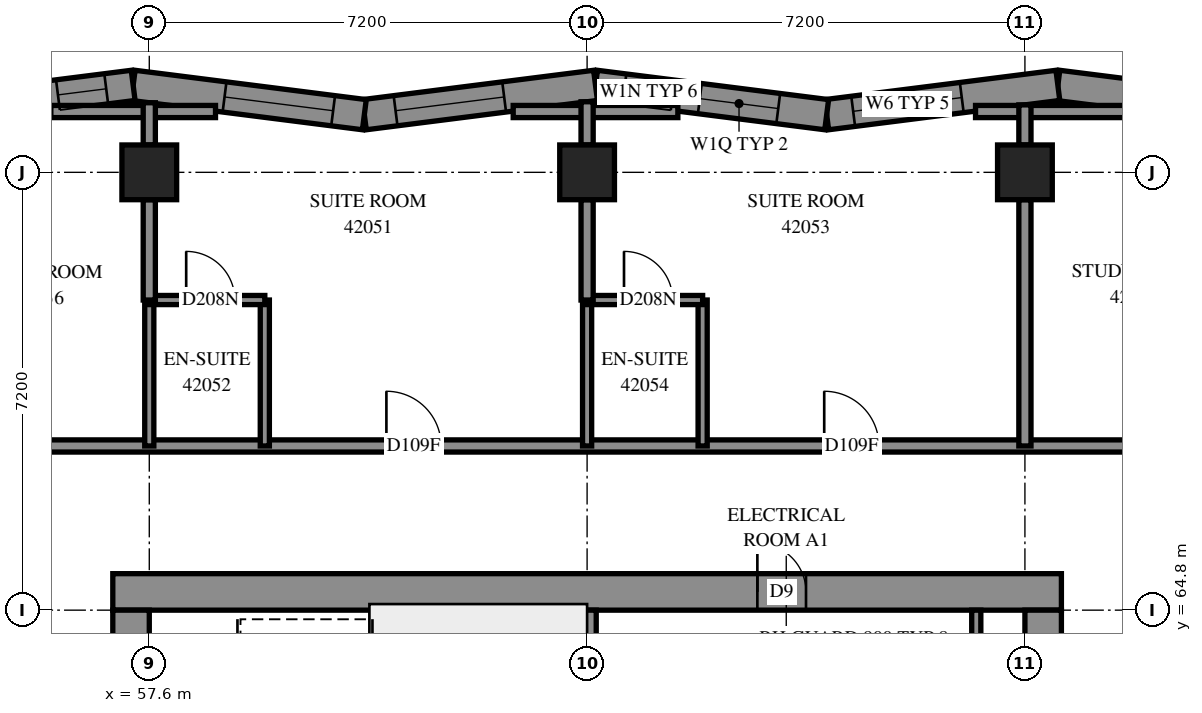
"""IFC4 building model, lengths in metres.
Left out: names, types, materials, properties, quantities, classifications, styles, units other than length and angle.
Written with IfcOpenShell. Run it as: python <this file> out.ifc"""

import sys

from ifc_helpers import new_model, si_unit, direction, frame, frame_2d, origin, origin_2d, place, context, subcontext, project, spatial, polyline, rectangle, outline, extrude, element, fill, save


model = new_model("IFC4")
c1 = context("Model", 3, precision=1e-05, world=origin(), true_north=direction((0.0, 1.0)))
c2 = subcontext(c1, "Body", "Model", "MODEL_VIEW")
j1 = project(units=[si_unit("LENGTHUNIT", "METRE"), si_unit("PLANEANGLEUNIT", "RADIAN")], contexts=[c1])
p1 = place(None, origin())
s1 = spatial("IfcSite", under=j1, at=p1, CompositionType="ELEMENT")
p2 = place(p1, origin())
s2 = spatial("IfcBuilding", under=s1, at=p2, CompositionType="ELEMENT")
p3 = place(p2, frame((0.0, 0.0, 155.8)))
s3 = spatial("IfcBuildingStorey", under=s2, at=p3, CompositionType="ELEMENT", Elevation=155.8)
for number, where, z_axis, x_axis in (
    (1, (57.6, 72.0, 0.0), (0.0, 0.0, 1.0), (1.0, 0.0, 0.0)),
    (2, (64.8, 72.0, 0.0), (0.0, 0.0, 1.0), (1.0, 0.0, 0.0)),
    (3, (72.0, 72.0, 0.0), (0.0, 0.0, 1.0), (1.0, 0.0, 0.0)),
):
    element("IfcColumn", number, at=place(p3, frame(where, z_axis=z_axis, x_axis=x_axis)), inside=s3, PredefinedType="COLUMN", context=c2, shape_type="SweptSolid", body=[
        extrude(rectangle(XDim=0.9, YDim=0.9, at=origin_2d()), origin(), (0.0, 0.0, 1.0), 3.1),
    ])
p4 = place(p3, frame((57.0, 65.1, -0.3), z_axis=(0.0, 0.0, 1.0), x_axis=(1.0, 0.0, 0.0)))
e4 = element("IfcWall", 4, at=p4, inside=s3, PredefinedType="SHEAR", context=c2, shape_type="SweptSolid", body=[
    extrude(rectangle(XDim=15.6, YDim=0.6, at=frame_2d((7.8, 0.0))), origin(), (0.0, 0.0, 1.0), 2.7),
])
p5 = place(p4, frame((10.6, 0.0, 0.3)))
e5 = element("IfcOpeningElement", 5, at=p5, cuts=e4, PredefinedType="OPENING", context=c2, shape_type="SweptSolid", body=[
    extrude(rectangle(XDim=0.8, YDim=2.1, at=frame_2d((0.4, 1.05))), frame((0.0, 0.31, 0.0), z_axis=(0.0, -1.0, 0.0), x_axis=(1.0, 0.0, 0.0)), (0.0, 0.0, 1.0), 0.62),
])
p6 = place(p3, frame((57.3, 50.4, -0.3), z_axis=(0.0, 0.0, 1.0), x_axis=(0.0, 1.0, 0.0)))
e6 = element("IfcWall", 6, at=p6, inside=s3, PredefinedType="SHEAR", context=c2, shape_type="SweptSolid", body=[
    extrude(rectangle(XDim=14.4, YDim=0.6, at=frame_2d((7.2, 0.0))), origin(), (0.0, 0.0, 1.0), 2.7),
])
p7 = place(p6, frame((4.55, 0.0, 0.3)))
e7 = element("IfcOpeningElement", 7, at=p7, cuts=e6, PredefinedType="OPENING", context=c2, shape_type="SweptSolid", body=[
    extrude(rectangle(XDim=1.1, YDim=2.1, at=frame_2d((0.55, 1.05))), frame((0.0, 0.31, 0.0), z_axis=(0.0, -1.0, 0.0), x_axis=(1.0, 0.0, 0.0)), (0.0, 0.0, 1.0), 0.62),
])
p8 = place(p6, frame((11.35, 0.0, 0.3)))
e8 = element("IfcOpeningElement", 8, at=p8, cuts=e6, PredefinedType="OPENING", context=c2, shape_type="SweptSolid", body=[
    extrude(rectangle(XDim=1.1, YDim=2.1, at=frame_2d((0.55, 1.05))), frame((0.0, 0.31, 0.0), z_axis=(0.0, -1.0, 0.0), x_axis=(1.0, 0.0, 0.0)), (0.0, 0.0, 1.0), 0.62),
])
p9 = place(p3, frame((72.3, 50.4, -0.3), z_axis=(0.0, 0.0, 1.0), x_axis=(0.0, 1.0, 0.0)))
e9 = element("IfcWall", 9, at=p9, inside=s3, PredefinedType="SHEAR", context=c2, shape_type="SweptSolid", body=[
    extrude(rectangle(XDim=14.4, YDim=0.6, at=frame_2d((7.2, 0.0))), origin(), (0.0, 0.0, 1.0), 2.7),
])
p10 = place(p9, frame((4.55, 0.0, 0.3)))
e10 = element("IfcOpeningElement", 10, at=p10, cuts=e9, PredefinedType="OPENING", context=c2, shape_type="SweptSolid", body=[
    extrude(rectangle(XDim=1.1, YDim=2.1, at=frame_2d((0.55, 1.05))), frame((0.0, 0.31, 0.0), z_axis=(0.0, -1.0, 0.0), x_axis=(1.0, 0.0, 0.0)), (0.0, 0.0, 1.0), 0.62),
])
p11 = place(p9, frame((11.35, 0.0, 0.3)))
e11 = element("IfcOpeningElement", 11, at=p11, cuts=e9, PredefinedType="OPENING", context=c2, shape_type="SweptSolid", body=[
    extrude(rectangle(XDim=1.1, YDim=2.1, at=frame_2d((0.55, 1.05))), frame((0.0, 0.31, 0.0), z_axis=(0.0, -1.0, 0.0), x_axis=(1.0, 0.0, 0.0)), (0.0, 0.0, 1.0), 0.62),
])
p12 = place(p3, frame((64.8, 60.6, 0.0), z_axis=(0.0, 0.0, 1.0), x_axis=(0.0, 1.0, 0.0)))
e12 = element("IfcWall", 12, at=p12, inside=s3, PredefinedType="SOLIDWALL", context=c2, shape_type="SweptSolid", body=[
    extrude(rectangle(XDim=4.2, YDim=0.3, at=frame_2d((2.1, 0.0))), origin(), (0.0, 0.0, 1.0), 3.1),
])
p13 = place(p3, frame((76.363, 72.946, 0.0), z_axis=(0.0, 0.0, 1.0), x_axis=(-0.9920594601, 0.1257697408, 0.0)))
e13 = element("IfcWall", 13, at=p13, inside=s3, PredefinedType="SOLIDWALL", context=c2, shape_type="SweptSolid", body=[
    extrude(outline(polyline([(0.051, -0.25), (3.883, -0.25), (3.82, 0.25), (-0.051, 0.25), (0.051, -0.25)])), origin(), (0.0, 0.0, 1.0), 3.1),
])
p14 = place(p13, frame((1.144, 0.0, 0.45)))
e14 = element("IfcOpeningElement", 14, at=p14, cuts=e13, PredefinedType="OPENING", context=c2, shape_type="SweptSolid", body=[
    extrude(rectangle(XDim=1.2, YDim=2.5, at=frame_2d((0.6, 1.25))), frame((0.0, 0.26, 0.0), z_axis=(0.0, -1.0, 0.0), x_axis=(1.0, 0.0, 0.0)), (0.0, 0.0, 1.0), 0.52),
])
p15 = place(p3, frame((72.542, 73.43, 0.0), z_axis=(0.0, 0.0, 1.0), x_axis=(-0.9920583495, -0.1257785003, 0.0)))
e15 = element("IfcWall", 15, at=p15, inside=s3, PredefinedType="SOLIDWALL", context=c2, shape_type="SweptSolid", body=[
    extrude(outline(polyline([(-0.032, -0.25), (3.8, -0.25), (3.864, 0.25), (0.032, 0.25), (-0.032, -0.25)])), origin(), (0.0, 0.0, 1.0), 3.1),
])
p16 = place(p15, frame((1.593, 0.0, 0.7)))
e16 = element("IfcOpeningElement", 16, at=p16, cuts=e15, PredefinedType="OPENING", context=c2, shape_type="SweptSolid", body=[
    extrude(rectangle(XDim=1.8, YDim=2.2, at=frame_2d((0.9, 1.1))), frame((0.0, 0.26, 0.0), z_axis=(0.0, -1.0, 0.0), x_axis=(1.0, 0.0, 0.0)), (0.0, 0.0, 1.0), 0.52),
])
p17 = place(p3, frame((68.74, 72.948, 0.0), z_axis=(0.0, 0.0, 1.0), x_axis=(-0.9920583495, 0.1257785003, 0.0)))
e17 = element("IfcWall", 17, at=p17, inside=s3, PredefinedType="SOLIDWALL", context=c2, shape_type="SweptSolid", body=[
    extrude(outline(polyline([(0.032, -0.25), (3.864, -0.25), (3.8, 0.25), (-0.032, 0.25), (0.032, -0.25)])), origin(), (0.0, 0.0, 1.0), 3.1),
])
p18 = place(p17, frame((0.803, 0.0, 0.45)))
e18 = element("IfcOpeningElement", 18, at=p18, cuts=e17, PredefinedType="OPENING", context=c2, shape_type="SweptSolid", body=[
    extrude(rectangle(XDim=1.3, YDim=2.5, at=frame_2d((0.65, 1.25))), frame((0.0, 0.26, 0.0), z_axis=(0.0, -1.0, 0.0), x_axis=(1.0, 0.0, 0.0)), (0.0, 0.0, 1.0), 0.52),
])
p19 = place(p17, frame((2.553, 0.0, 0.45)))
e19 = element("IfcOpeningElement", 19, at=p19, cuts=e17, PredefinedType="OPENING", context=c2, shape_type="SweptSolid", body=[
    extrude(rectangle(XDim=0.8, YDim=2.5, at=frame_2d((0.4, 1.25))), frame((0.0, 0.26, 0.0), z_axis=(0.0, -1.0, 0.0), x_axis=(1.0, 0.0, 0.0)), (0.0, 0.0, 1.0), 0.52),
])
p20 = place(p3, frame((64.939, 73.43, 0.0), z_axis=(0.0, 0.0, 1.0), x_axis=(-0.9920583495, -0.1257785003, 0.0)))
e20 = element("IfcWall", 20, at=p20, inside=s3, PredefinedType="SOLIDWALL", context=c2, shape_type="SweptSolid", body=[
    extrude(outline(polyline([(-0.032, -0.25), (3.8, -0.25), (3.864, 0.25), (0.032, 0.25), (-0.032, -0.25)])), origin(), (0.0, 0.0, 1.0), 3.1),
])
p21 = place(p20, frame((1.515, 0.0, 0.7)))
e21 = element("IfcOpeningElement", 21, at=p21, cuts=e20, PredefinedType="OPENING", context=c2, shape_type="SweptSolid", body=[
    extrude(rectangle(XDim=1.8, YDim=2.2, at=frame_2d((0.9, 1.1))), frame((0.0, 0.26, 0.0), z_axis=(0.0, -1.0, 0.0), x_axis=(1.0, 0.0, 0.0)), (0.0, 0.0, 1.0), 0.52),
])
p22 = place(p3, frame((61.137, 72.948, 0.0), z_axis=(0.0, 0.0, 1.0), x_axis=(-0.9920587623, 0.1257752442, 0.0)))
e22 = element("IfcWall", 22, at=p22, inside=s3, PredefinedType="SOLIDWALL", context=c2, shape_type="SweptSolid", body=[
    extrude(outline(polyline([(0.032, -0.25), (3.864, -0.25), (3.8, 0.25), (-0.032, 0.25), (0.032, -0.25)])), origin(), (0.0, 0.0, 1.0), 3.1),
])
p23 = place(p22, frame((0.517, 0.0, 0.7)))
e23 = element("IfcOpeningElement", 23, at=p23, cuts=e22, PredefinedType="OPENING", context=c2, shape_type="SweptSolid", body=[
    extrude(rectangle(XDim=1.8, YDim=2.2, at=frame_2d((0.9, 1.1))), frame((0.0, 0.26, 0.0), z_axis=(0.0, -1.0, 0.0), x_axis=(1.0, 0.0, 0.0)), (0.0, 0.0, 1.0), 0.52),
])
p24 = place(p3, frame((57.335, 73.43, 0.0), z_axis=(0.0, 0.0, 1.0), x_axis=(-0.9920583495, -0.1257785003, 0.0)))
e24 = element("IfcWall", 24, at=p24, inside=s3, PredefinedType="SOLIDWALL", context=c2, shape_type="SweptSolid", body=[
    extrude(outline(polyline([(-0.032, -0.25), (3.8, -0.25), (3.864, 0.25), (0.032, 0.25), (-0.032, -0.25)])), origin(), (0.0, 0.0, 1.0), 3.1),
])
p25 = place(p24, frame((0.447, 0.0, 0.45)))
e25 = element("IfcOpeningElement", 25, at=p25, cuts=e24, PredefinedType="OPENING", context=c2, shape_type="SweptSolid", body=[
    extrude(rectangle(XDim=0.8, YDim=2.5, at=frame_2d((0.4, 1.25))), frame((0.0, 0.26, 0.0), z_axis=(0.0, -1.0, 0.0), x_axis=(1.0, 0.0, 0.0)), (0.0, 0.0, 1.0), 0.52),
])
p26 = place(p24, frame((1.697, 0.0, 0.45)))
e26 = element("IfcOpeningElement", 26, at=p26, cuts=e24, PredefinedType="OPENING", context=c2, shape_type="SweptSolid", body=[
    extrude(rectangle(XDim=1.3, YDim=2.5, at=frame_2d((0.65, 1.25))), frame((0.0, 0.26, 0.0), z_axis=(0.0, -1.0, 0.0), x_axis=(1.0, 0.0, 0.0)), (0.0, 0.0, 1.0), 0.52),
])
p27 = place(p3, frame((71.2, 63.78, 0.0), z_axis=(0.0, 0.0, 1.0), x_axis=(0.0, 1.0, 0.0)))
e27 = element("IfcWall", 27, at=p27, inside=s3, PredefinedType="PARTITIONING", context=c2, shape_type="SweptSolid", body=[
    extrude(rectangle(XDim=1.02, YDim=0.15, at=frame_2d((0.51, 0.0))), origin(), (0.0, 0.0, 1.0), 3.1),
])
p28 = place(p3, frame((54.9, 67.5, 0.0), z_axis=(0.0, 0.0, 1.0), x_axis=(1.0, 0.0, 0.0)))
e28 = element("IfcWall", 28, at=p28, inside=s3, PredefinedType="PARTITIONING", context=c2, shape_type="SweptSolid", body=[
    extrude(rectangle(XDim=19.8, YDim=0.2, at=frame_2d((9.9, 0.0))), origin(), (0.0, 0.0, 1.0), 3.1),
])
p29 = place(p28, frame((6.599, 0.0, 0.0)))
e29 = element("IfcOpeningElement", 29, at=p29, cuts=e28, PredefinedType="OPENING", context=c2, shape_type="SweptSolid", body=[
    extrude(rectangle(XDim=0.9, YDim=2.1, at=frame_2d((0.45, 1.05))), frame((0.0, 0.11, 0.0), z_axis=(0.0, -1.0, 0.0), x_axis=(1.0, 0.0, 0.0)), (0.0, 0.0, 1.0), 0.22),
])
p30 = place(p28, frame((13.799, 0.0, 0.0)))
e30 = element("IfcOpeningElement", 30, at=p30, cuts=e28, PredefinedType="OPENING", context=c2, shape_type="SweptSolid", body=[
    extrude(rectangle(XDim=0.9, YDim=2.1, at=frame_2d((0.45, 1.05))), frame((0.0, 0.11, 0.0), z_axis=(0.0, -1.0, 0.0), x_axis=(1.0, 0.0, 0.0)), (0.0, 0.0, 1.0), 0.22),
])
p31 = place(p3, frame((72.0, 67.5, 0.0), z_axis=(0.0, 0.0, 1.0), x_axis=(0.0, 1.0, 0.0)))
e31 = element("IfcWall", 31, at=p31, inside=s3, PredefinedType="PARTITIONING", context=c2, shape_type="SweptSolid", body=[
    extrude(rectangle(XDim=4.05, YDim=0.2, at=frame_2d((2.025, 0.0))), origin(), (0.0, 0.0, 1.0), 3.1),
])
for number, where, z_axis, x_axis in (
    (32, (63.584, 73.0, 0.0), (0.0, 0.0, 1.0), (1.0, 0.0, 0.0)),
    (33, (71.188, 73.0, 0.0), (0.0, 0.0, 1.0), (1.0, 0.0, 0.0)),
    (34, (55.981, 73.0, 0.0), (0.0, 0.0, 1.0), (1.0, 0.0, 0.0)),
):
    element("IfcWall", number, at=place(p3, frame(where, z_axis=z_axis, x_axis=x_axis)), inside=s3, PredefinedType="PARTITIONING", context=c2, shape_type="SweptSolid", body=[
        extrude(rectangle(XDim=2.708, YDim=0.2, at=frame_2d((1.354, 0.0))), origin(), (0.0, 0.0, 1.0), 3.1),
    ])
for number, where, z_axis, x_axis in (
    (35, (59.5, 67.5, 0.0), (0.0, 0.0, 1.0), (0.0, 1.0, 0.0)),
    (36, (57.6, 67.5, 0.0), (0.0, 0.0, 1.0), (0.0, 1.0, 0.0)),
    (37, (66.7, 67.5, 0.0), (0.0, 0.0, 1.0), (0.0, 1.0, 0.0)),
    (38, (64.8, 67.5, 0.0), (0.0, 0.0, 1.0), (0.0, 1.0, 0.0)),
):
    element("IfcWall", number, at=place(p3, frame(where, z_axis=z_axis, x_axis=x_axis)), inside=s3, PredefinedType="PARTITIONING", context=c2, shape_type="SweptSolid", body=[
        extrude(rectangle(XDim=2.4, YDim=0.15, at=frame_2d((1.2, 0.0))), origin(), (0.0, 0.0, 1.0), 3.1),
    ])
p32 = place(p3, frame((64.8, 69.9, 0.0), z_axis=(0.0, 0.0, 1.0), x_axis=(1.0, 0.0, 0.0)))
e39 = element("IfcWall", 39, at=p32, inside=s3, PredefinedType="PARTITIONING", context=c2, shape_type="SweptSolid", body=[
    extrude(rectangle(XDim=1.9, YDim=0.15, at=frame_2d((0.95, 0.0))), origin(), (0.0, 0.0, 1.0), 3.1),
])
p33 = place(p32, frame((0.607, 0.0, 0.0)))
e40 = element("IfcOpeningElement", 40, at=p33, cuts=e39, PredefinedType="OPENING", context=c2, shape_type="SweptSolid", body=[
    extrude(rectangle(XDim=0.8, YDim=2.1, at=frame_2d((0.4, 1.05))), frame((0.0, 0.085, 0.0), z_axis=(0.0, -1.0, 0.0), x_axis=(1.0, 0.0, 0.0)), (0.0, 0.0, 1.0), 0.17),
])
p34 = place(p3, frame((57.6, 69.9, 0.0), z_axis=(0.0, 0.0, 1.0), x_axis=(1.0, 0.0, 0.0)))
e41 = element("IfcWall", 41, at=p34, inside=s3, PredefinedType="PARTITIONING", context=c2, shape_type="SweptSolid", body=[
    extrude(rectangle(XDim=1.9, YDim=0.15, at=frame_2d((0.95, 0.0))), origin(), (0.0, 0.0, 1.0), 3.1),
])
p35 = place(p34, frame((0.607, 0.0, 0.0)))
e42 = element("IfcOpeningElement", 42, at=p35, cuts=e41, PredefinedType="OPENING", context=c2, shape_type="SweptSolid", body=[
    extrude(rectangle(XDim=0.8, YDim=2.1, at=frame_2d((0.4, 1.05))), frame((0.0, 0.085, 0.0), z_axis=(0.0, -1.0, 0.0), x_axis=(1.0, 0.0, 0.0)), (0.0, 0.0, 1.0), 0.17),
])
for number, where, z_axis, x_axis in (
    (43, (57.6, 69.9, 0.0), (0.0, 0.0, 1.0), (0.0, 1.0, 0.0)),
    (44, (64.8, 69.9, 0.0), (0.0, 0.0, 1.0), (0.0, 1.0, 0.0)),
):
    element("IfcWall", number, at=place(p3, frame(where, z_axis=z_axis, x_axis=x_axis)), inside=s3, PredefinedType="PARTITIONING", context=c2, shape_type="SweptSolid", body=[
        extrude(rectangle(XDim=1.65, YDim=0.2, at=frame_2d((0.825, 0.0))), origin(), (0.0, 0.0, 1.0), 3.1),
    ])
p36 = place(p3, frame((57.6, 72.45, 0.0), z_axis=(0.0, 0.0, 1.0), x_axis=(0.0, 1.0, 0.0)))
e45 = element("IfcWall", 45, at=p36, inside=s3, PredefinedType="PARTITIONING", context=c2, shape_type="SweptSolid", body=[
    extrude(rectangle(XDim=0.694, YDim=0.2, at=frame_2d((0.347, 0.0))), origin(), (0.0, 0.0, 1.0), 3.1),
])
p37 = place(p3, frame((72.0, 72.45, 0.0), z_axis=(0.0, 0.0, 1.0), x_axis=(0.0, 1.0, 0.0)))
e46 = element("IfcWall", 46, at=p37, inside=s3, PredefinedType="PARTITIONING", context=c2, shape_type="SweptSolid", body=[
    extrude(rectangle(XDim=0.659, YDim=0.2, at=frame_2d((0.33, 0.0))), origin(), (0.0, 0.0, 1.0), 3.1),
])
p38 = place(p3, frame((64.8, 72.45, 0.0), z_axis=(0.0, 0.0, 1.0), x_axis=(0.0, 1.0, 0.0)))
e47 = element("IfcWall", 47, at=p38, inside=s3, PredefinedType="PARTITIONING", context=c2, shape_type="SweptSolid", body=[
    extrude(rectangle(XDim=0.71, YDim=0.2, at=frame_2d((0.355, 0.0))), origin(), (0.0, 0.0, 1.0), 3.1),
])
p39 = place(p5, origin())
e48 = element("IfcDoor", 48, at=p39, inside=s3, OperationType="SINGLE_SWING_RIGHT", PredefinedType="DOOR", context=c2, shape_type="SweptSolid", body=[
    extrude(rectangle(XDim=0.8, YDim=2.1, at=frame_2d((0.4, 1.05))), frame((0.0, 0.025, 0.0), z_axis=(0.0, -1.0, 0.0), x_axis=(1.0, 0.0, 0.0)), (0.0, 0.0, 1.0), 0.05),
])
fill(e5, e48)
p40 = place(p29, origin())
e49 = element("IfcDoor", 49, at=p40, inside=s3, OperationType="SINGLE_SWING_RIGHT", PredefinedType="DOOR", context=c2, shape_type="SweptSolid", body=[
    extrude(rectangle(XDim=0.9, YDim=2.1, at=frame_2d((0.45, 1.05))), frame((0.0, 0.025, 0.0), z_axis=(0.0, -1.0, 0.0), x_axis=(1.0, 0.0, 0.0)), (0.0, 0.0, 1.0), 0.05),
])
fill(e29, e49)
p41 = place(p35, origin())
e50 = element("IfcDoor", 50, at=p41, inside=s3, OperationType="SINGLE_SWING_RIGHT", PredefinedType="DOOR", context=c2, shape_type="SweptSolid", body=[
    extrude(rectangle(XDim=0.8, YDim=2.1, at=frame_2d((0.4, 1.05))), frame((0.0, 0.025, 0.0), z_axis=(0.0, -1.0, 0.0), x_axis=(1.0, 0.0, 0.0)), (0.0, 0.0, 1.0), 0.05),
])
fill(e42, e50)
p42 = place(p30, origin())
e51 = element("IfcDoor", 51, at=p42, inside=s3, OperationType="SINGLE_SWING_RIGHT", PredefinedType="DOOR", context=c2, shape_type="SweptSolid", body=[
    extrude(rectangle(XDim=0.9, YDim=2.1, at=frame_2d((0.45, 1.05))), frame((0.0, 0.025, 0.0), z_axis=(0.0, -1.0, 0.0), x_axis=(1.0, 0.0, 0.0)), (0.0, 0.0, 1.0), 0.05),
])
fill(e30, e51)
p43 = place(p33, origin())
e52 = element("IfcDoor", 52, at=p43, inside=s3, OperationType="SINGLE_SWING_RIGHT", PredefinedType="DOOR", context=c2, shape_type="SweptSolid", body=[
    extrude(rectangle(XDim=0.8, YDim=2.1, at=frame_2d((0.4, 1.05))), frame((0.0, 0.025, 0.0), z_axis=(0.0, -1.0, 0.0), x_axis=(1.0, 0.0, 0.0)), (0.0, 0.0, 1.0), 0.05),
])
fill(e40, e52)
p44 = place(p16, origin())
e53 = element("IfcWindow", 53, at=p44, inside=s3, PartitioningType="SINGLE_PANEL", PredefinedType="WINDOW", context=c2, shape_type="SweptSolid", body=[
    extrude(rectangle(XDim=1.8, YDim=2.2, at=frame_2d((0.9, 1.1))), frame((0.0, 0.18, 0.0), z_axis=(0.0, -1.0, 0.0), x_axis=(1.0, 0.0, 0.0)), (0.0, 0.0, 1.0), 0.06),
])
fill(e16, e53)
p45 = place(p18, origin())
e54 = element("IfcWindow", 54, at=p45, inside=s3, PartitioningType="SINGLE_PANEL", PredefinedType="WINDOW", context=c2, shape_type="SweptSolid", body=[
    extrude(rectangle(XDim=1.3, YDim=2.5, at=frame_2d((0.65, 1.25))), frame((0.0, 0.18, 0.0), z_axis=(0.0, -1.0, 0.0), x_axis=(1.0, 0.0, 0.0)), (0.0, 0.0, 1.0), 0.06),
])
fill(e18, e54)
p46 = place(p19, origin())
e55 = element("IfcWindow", 55, at=p46, inside=s3, PartitioningType="SINGLE_PANEL", PredefinedType="WINDOW", context=c2, shape_type="SweptSolid", body=[
    extrude(rectangle(XDim=0.8, YDim=2.5, at=frame_2d((0.4, 1.25))), frame((0.0, 0.14, 0.0), z_axis=(0.0, -1.0, 0.0), x_axis=(1.0, 0.0, 0.0)), (0.0, 0.0, 1.0), 0.06),
])
fill(e19, e55)
p47 = place(p21, origin())
e56 = element("IfcWindow", 56, at=p47, inside=s3, PartitioningType="SINGLE_PANEL", PredefinedType="WINDOW", context=c2, shape_type="SweptSolid", body=[
    extrude(rectangle(XDim=1.8, YDim=2.2, at=frame_2d((0.9, 1.1))), frame((0.0, 0.18, 0.0), z_axis=(0.0, -1.0, 0.0), x_axis=(1.0, 0.0, 0.0)), (0.0, 0.0, 1.0), 0.06),
])
fill(e21, e56)
p48 = place(p23, origin())
e57 = element("IfcWindow", 57, at=p48, inside=s3, PartitioningType="SINGLE_PANEL", PredefinedType="WINDOW", context=c2, shape_type="SweptSolid", body=[
    extrude(rectangle(XDim=1.8, YDim=2.2, at=frame_2d((0.9, 1.1))), frame((0.0, 0.18, 0.0), z_axis=(0.0, -1.0, 0.0), x_axis=(1.0, 0.0, 0.0)), (0.0, 0.0, 1.0), 0.06),
])
fill(e23, e57)
p49 = place(p25, origin())
e58 = element("IfcWindow", 58, at=p49, inside=s3, PartitioningType="SINGLE_PANEL", PredefinedType="WINDOW", context=c2, shape_type="SweptSolid", body=[
    extrude(rectangle(XDim=0.8, YDim=2.5, at=frame_2d((0.4, 1.25))), frame((0.0, 0.14, 0.0), z_axis=(0.0, -1.0, 0.0), x_axis=(1.0, 0.0, 0.0)), (0.0, 0.0, 1.0), 0.06),
])
fill(e25, e58)
save(model, sys.argv[1])
